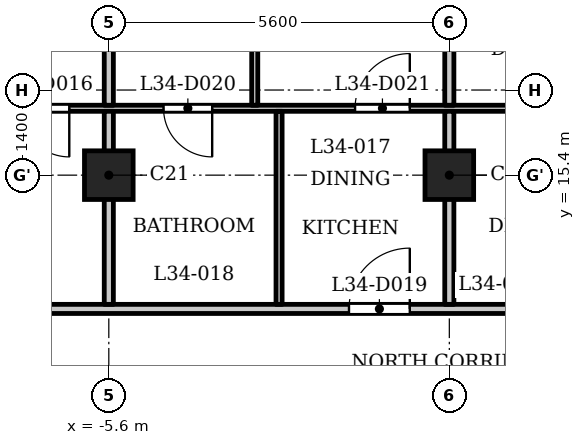
"""IFC4 building model, lengths in metres.
Left out: names, types, materials, properties, quantities, classifications, styles, units other than length and angle.
Written with IfcOpenShell. Run it as: python <this file> out.ifc"""

import sys

from ifc_helpers import new_model, si_unit, direction, frame, frame_2d, origin, origin_2d, place, context, subcontext, project, spatial, rectangle, extrude, element, fill, save


model = new_model("IFC4")
c1 = context("Model", 3, precision=1e-05, world=origin(), true_north=direction((0.0, 1.0)))
c2 = subcontext(c1, "Body", "Model", "MODEL_VIEW")
j1 = project(units=[si_unit("LENGTHUNIT", "METRE"), si_unit("PLANEANGLEUNIT", "RADIAN")], contexts=[c1])
p1 = place(None, origin())
s1 = spatial("IfcSite", under=j1, at=p1, CompositionType="ELEMENT")
p2 = place(p1, origin())
s2 = spatial("IfcBuilding", under=s1, at=p2, CompositionType="ELEMENT")
p3 = place(p2, frame((0.0, 0.0, 136.1)))
s3 = spatial("IfcBuildingStorey", under=s2, at=p3, CompositionType="ELEMENT", Elevation=136.1)
for number, where, z_axis, x_axis in (
    (1, (-5.6, 15.4, 0.0), (0.0, 0.0, 1.0), (1.0, 0.0, 0.0)),
    (2, (0.0, 15.4, 0.0), (0.0, 0.0, 1.0), (1.0, 0.0, 0.0)),
):
    element("IfcColumn", number, at=place(p3, frame(where, z_axis=z_axis, x_axis=x_axis)), inside=s3, PredefinedType="COLUMN", context=c2, shape_type="SweptSolid", body=[
        extrude(rectangle(XDim=0.8, YDim=0.8, at=origin_2d()), origin(), (0.0, 0.0, 1.0), 3.5),
    ])
p4 = place(p3, frame((-17.4, 13.2, 0.0), z_axis=(0.0, 0.0, 1.0), x_axis=(1.0, 0.0, 0.0)))
e3 = element("IfcWall", 3, at=p4, inside=s3, PredefinedType="PARTITIONING", context=c2, shape_type="SweptSolid", body=[
    extrude(rectangle(XDim=34.8, YDim=0.15, at=frame_2d((17.4, 0.0))), origin(), (0.0, 0.0, 1.0), 3.2),
])
p5 = place(p4, frame((0.25, 0.0, 0.0)))
e4 = element("IfcOpeningElement", 4, at=p5, cuts=e3, PredefinedType="OPENING", context=c2, shape_type="SweptSolid", body=[
    extrude(rectangle(XDim=1.0, YDim=2.1, at=frame_2d((0.5, 1.05))), frame((0.0, 0.085, 0.0), z_axis=(0.0, -1.0, 0.0), x_axis=(1.0, 0.0, 0.0)), (0.0, 0.0, 1.0), 0.17),
])
p6 = place(p4, frame((33.65, 0.0, 0.0)))
e5 = element("IfcOpeningElement", 5, at=p6, cuts=e3, PredefinedType="OPENING", context=c2, shape_type="SweptSolid", body=[
    extrude(rectangle(XDim=1.0, YDim=2.1, at=frame_2d((0.5, 1.05))), frame((0.0, 0.085, 0.0), z_axis=(0.0, -1.0, 0.0), x_axis=(1.0, 0.0, 0.0)), (0.0, 0.0, 1.0), 0.17),
])
p7 = place(p4, frame((15.75, 0.0, 0.0)))
e6 = element("IfcOpeningElement", 6, at=p7, cuts=e3, PredefinedType="OPENING", context=c2, shape_type="SweptSolid", body=[
    extrude(rectangle(XDim=1.0, YDim=2.1, at=frame_2d((0.5, 1.05))), frame((0.0, 0.085, 0.0), z_axis=(0.0, -1.0, 0.0), x_axis=(1.0, 0.0, 0.0)), (0.0, 0.0, 1.0), 0.17),
])
p8 = place(p4, frame((19.35, 0.0, 0.0)))
e7 = element("IfcOpeningElement", 7, at=p8, cuts=e3, PredefinedType="OPENING", context=c2, shape_type="SweptSolid", body=[
    extrude(rectangle(XDim=1.0, YDim=2.1, at=frame_2d((0.5, 1.05))), frame((0.0, 0.085, 0.0), z_axis=(0.0, -1.0, 0.0), x_axis=(1.0, 0.0, 0.0)), (0.0, 0.0, 1.0), 0.17),
])
p9 = place(p4, frame((26.95, 0.0, 0.0)))
e8 = element("IfcOpeningElement", 8, at=p9, cuts=e3, PredefinedType="OPENING", context=c2, shape_type="SweptSolid", body=[
    extrude(rectangle(XDim=1.0, YDim=2.1, at=frame_2d((0.5, 1.05))), frame((0.0, 0.085, 0.0), z_axis=(0.0, -1.0, 0.0), x_axis=(1.0, 0.0, 0.0)), (0.0, 0.0, 1.0), 0.17),
])
p10 = place(p4, frame((29.75, 0.0, 0.0)))
e9 = element("IfcOpeningElement", 9, at=p10, cuts=e3, PredefinedType="OPENING", context=c2, shape_type="SweptSolid", body=[
    extrude(rectangle(XDim=1.0, YDim=2.1, at=frame_2d((0.5, 1.05))), frame((0.0, 0.085, 0.0), z_axis=(0.0, -1.0, 0.0), x_axis=(1.0, 0.0, 0.0)), (0.0, 0.0, 1.0), 0.17),
])
p11 = place(p3, frame((-16.725, 16.5, 0.0), z_axis=(0.0, 0.0, 1.0), x_axis=(1.0, 0.0, 0.0)))
e10 = element("IfcWall", 10, at=p11, inside=s3, PredefinedType="PARTITIONING", context=c2, shape_type="SweptSolid", body=[
    extrude(rectangle(XDim=33.45, YDim=0.1, at=frame_2d((16.725, 0.0))), origin(), (0.0, 0.0, 1.0), 3.2),
])
p12 = place(p11, frame((9.675, 0.0, 0.0)))
e11 = element("IfcOpeningElement", 11, at=p12, cuts=e10, PredefinedType="OPENING", context=c2, shape_type="SweptSolid", body=[
    extrude(rectangle(XDim=0.8, YDim=2.1, at=frame_2d((0.4, 1.05))), frame((0.0, 0.06, 0.0), z_axis=(0.0, -1.0, 0.0), x_axis=(1.0, 0.0, 0.0)), (0.0, 0.0, 1.0), 0.12),
])
p13 = place(p11, frame((3.975, 0.0, 0.0)))
e12 = element("IfcOpeningElement", 12, at=p13, cuts=e10, PredefinedType="OPENING", context=c2, shape_type="SweptSolid", body=[
    extrude(rectangle(XDim=0.9, YDim=2.1, at=frame_2d((0.45, 1.05))), frame((0.0, 0.06, 0.0), z_axis=(0.0, -1.0, 0.0), x_axis=(1.0, 0.0, 0.0)), (0.0, 0.0, 1.0), 0.12),
])
p14 = place(p11, frame((12.025, 0.0, 0.0)))
e13 = element("IfcOpeningElement", 13, at=p14, cuts=e10, PredefinedType="OPENING", context=c2, shape_type="SweptSolid", body=[
    extrude(rectangle(XDim=0.8, YDim=2.1, at=frame_2d((0.4, 1.05))), frame((0.0, 0.06, 0.0), z_axis=(0.0, -1.0, 0.0), x_axis=(1.0, 0.0, 0.0)), (0.0, 0.0, 1.0), 0.12),
])
p15 = place(p11, frame((15.175, 0.0, 0.0)))
e14 = element("IfcOpeningElement", 14, at=p15, cuts=e10, PredefinedType="OPENING", context=c2, shape_type="SweptSolid", body=[
    extrude(rectangle(XDim=0.9, YDim=2.1, at=frame_2d((0.45, 1.05))), frame((0.0, 0.06, 0.0), z_axis=(0.0, -1.0, 0.0), x_axis=(1.0, 0.0, 0.0)), (0.0, 0.0, 1.0), 0.12),
])
p16 = place(p11, frame((20.975, 0.0, 0.0)))
e15 = element("IfcOpeningElement", 15, at=p16, cuts=e10, PredefinedType="OPENING", context=c2, shape_type="SweptSolid", body=[
    extrude(rectangle(XDim=0.8, YDim=2.1, at=frame_2d((0.4, 1.05))), frame((0.0, 0.06, 0.0), z_axis=(0.0, -1.0, 0.0), x_axis=(1.0, 0.0, 0.0)), (0.0, 0.0, 1.0), 0.12),
])
p17 = place(p11, frame((18.175, 0.0, 0.0)))
e16 = element("IfcOpeningElement", 16, at=p17, cuts=e10, PredefinedType="OPENING", context=c2, shape_type="SweptSolid", body=[
    extrude(rectangle(XDim=0.9, YDim=2.1, at=frame_2d((0.45, 1.05))), frame((0.0, 0.06, 0.0), z_axis=(0.0, -1.0, 0.0), x_axis=(1.0, 0.0, 0.0)), (0.0, 0.0, 1.0), 0.12),
])
p18 = place(p11, frame((23.725, 0.0, 0.0)))
e17 = element("IfcOpeningElement", 17, at=p18, cuts=e10, PredefinedType="OPENING", context=c2, shape_type="SweptSolid", body=[
    extrude(rectangle(XDim=0.8, YDim=2.1, at=frame_2d((0.4, 1.05))), frame((0.0, 0.06, 0.0), z_axis=(0.0, -1.0, 0.0), x_axis=(1.0, 0.0, 0.0)), (0.0, 0.0, 1.0), 0.12),
])
p19 = place(p11, frame((26.125, 0.0, 0.0)))
e18 = element("IfcOpeningElement", 18, at=p19, cuts=e10, PredefinedType="OPENING", context=c2, shape_type="SweptSolid", body=[
    extrude(rectangle(XDim=0.9, YDim=2.1, at=frame_2d((0.45, 1.05))), frame((0.0, 0.06, 0.0), z_axis=(0.0, -1.0, 0.0), x_axis=(1.0, 0.0, 0.0)), (0.0, 0.0, 1.0), 0.12),
])
p20 = place(p11, frame((32.125, 0.0, 0.0)))
e19 = element("IfcOpeningElement", 19, at=p20, cuts=e10, PredefinedType="OPENING", context=c2, shape_type="SweptSolid", body=[
    extrude(rectangle(XDim=0.8, YDim=2.1, at=frame_2d((0.4, 1.05))), frame((0.0, 0.06, 0.0), z_axis=(0.0, -1.0, 0.0), x_axis=(1.0, 0.0, 0.0)), (0.0, 0.0, 1.0), 0.12),
])
p21 = place(p11, frame((28.975, 0.0, 0.0)))
e20 = element("IfcOpeningElement", 20, at=p21, cuts=e10, PredefinedType="OPENING", context=c2, shape_type="SweptSolid", body=[
    extrude(rectangle(XDim=0.9, YDim=2.1, at=frame_2d((0.45, 1.05))), frame((0.0, 0.06, 0.0), z_axis=(0.0, -1.0, 0.0), x_axis=(1.0, 0.0, 0.0)), (0.0, 0.0, 1.0), 0.12),
])
p22 = place(p3, frame((-5.6, 13.275, 0.0), z_axis=(0.0, 0.0, 1.0), x_axis=(0.0, 1.0, 0.0)))
e21 = element("IfcWall", 21, at=p22, inside=s3, PredefinedType="PARTITIONING", context=c2, shape_type="SweptSolid", body=[
    extrude(rectangle(XDim=3.175, YDim=0.15, at=frame_2d((1.587, 0.0))), origin(), (0.0, 0.0, 1.0), 3.2),
])
p23 = place(p3, frame((-5.6, 16.55, 0.0), z_axis=(0.0, 0.0, 1.0), x_axis=(0.0, 1.0, 0.0)))
e22 = element("IfcWall", 22, at=p23, inside=s3, PredefinedType="PARTITIONING", context=c2, shape_type="SweptSolid", body=[
    extrude(rectangle(XDim=6.38, YDim=0.15, at=frame_2d((3.19, 0.0))), origin(), (0.0, 0.0, 1.0), 3.2),
])
p24 = place(p3, frame((-3.2, 16.55, 0.0), z_axis=(0.0, 0.0, 1.0), x_axis=(0.0, 1.0, 0.0)))
e23 = element("IfcWall", 23, at=p24, inside=s3, PredefinedType="PARTITIONING", context=c2, shape_type="SweptSolid", body=[
    extrude(rectangle(XDim=5.53, YDim=0.1, at=frame_2d((2.765, 0.0))), origin(), (0.0, 0.0, 1.0), 3.2),
])
p25 = place(p24, frame((1.46, 0.0, 0.0)))
e24 = element("IfcOpeningElement", 24, at=p25, cuts=e23, PredefinedType="OPENING", context=c2, shape_type="SweptSolid", body=[
    extrude(rectangle(XDim=0.9, YDim=2.1, at=frame_2d((0.45, 1.05))), frame((0.0, 0.06, 0.0), z_axis=(0.0, -1.0, 0.0), x_axis=(1.0, 0.0, 0.0)), (0.0, 0.0, 1.0), 0.12),
])
p26 = place(p3, frame((-2.8, 13.275, 0.0), z_axis=(0.0, 0.0, 1.0), x_axis=(0.0, 1.0, 0.0)))
e25 = element("IfcWall", 25, at=p26, inside=s3, PredefinedType="PARTITIONING", context=c2, shape_type="SweptSolid", body=[
    extrude(rectangle(XDim=3.175, YDim=0.1, at=frame_2d((1.587, 0.0))), origin(), (0.0, 0.0, 1.0), 3.2),
])
p27 = place(p3, frame((0.0, 13.275, 0.0), z_axis=(0.0, 0.0, 1.0), x_axis=(0.0, 1.0, 0.0)))
e26 = element("IfcWall", 26, at=p27, inside=s3, PredefinedType="PARTITIONING", context=c2, shape_type="SweptSolid", body=[
    extrude(rectangle(XDim=3.175, YDim=0.15, at=frame_2d((1.587, 0.0))), origin(), (0.0, 0.0, 1.0), 3.2),
])
p28 = place(p3, frame((0.0, 16.55, 0.0), z_axis=(0.0, 0.0, 1.0), x_axis=(0.0, 1.0, 0.0)))
e27 = element("IfcWall", 27, at=p28, inside=s3, PredefinedType="PARTITIONING", context=c2, shape_type="SweptSolid", body=[
    extrude(rectangle(XDim=6.38, YDim=0.15, at=frame_2d((3.19, 0.0))), origin(), (0.0, 0.0, 1.0), 3.2),
])
p29 = place(p12, origin())
e28 = element("IfcDoor", 28, at=p29, inside=s3, OperationType="SINGLE_SWING_RIGHT", PredefinedType="DOOR", context=c2, shape_type="SweptSolid", body=[
    extrude(rectangle(XDim=0.8, YDim=2.1, at=frame_2d((0.4, 1.05))), frame((0.0, 0.025, 0.0), z_axis=(0.0, -1.0, 0.0), x_axis=(1.0, 0.0, 0.0)), (0.0, 0.0, 1.0), 0.05),
])
fill(e11, e28)
p30 = place(p7, origin())
e29 = element("IfcDoor", 29, at=p30, inside=s3, OperationType="SINGLE_SWING_LEFT", PredefinedType="DOOR", context=c2, shape_type="SweptSolid", body=[
    extrude(rectangle(XDim=1.0, YDim=2.1, at=frame_2d((0.5, 1.05))), frame((0.0, 0.025, 0.0), z_axis=(0.0, -1.0, 0.0), x_axis=(1.0, 0.0, 0.0)), (0.0, 0.0, 1.0), 0.05),
])
fill(e6, e29)
p31 = place(p14, origin())
e30 = element("IfcDoor", 30, at=p31, inside=s3, OperationType="SINGLE_SWING_RIGHT", PredefinedType="DOOR", context=c2, shape_type="SweptSolid", body=[
    extrude(rectangle(XDim=0.8, YDim=2.1, at=frame_2d((0.4, 1.05))), frame((0.0, 0.025, 0.0), z_axis=(0.0, -1.0, 0.0), x_axis=(1.0, 0.0, 0.0)), (0.0, 0.0, 1.0), 0.05),
])
fill(e13, e30)
p32 = place(p15, origin())
e31 = element("IfcDoor", 31, at=p32, inside=s3, OperationType="SINGLE_SWING_LEFT", PredefinedType="DOOR", context=c2, shape_type="SweptSolid", body=[
    extrude(rectangle(XDim=0.9, YDim=2.1, at=frame_2d((0.45, 1.05))), frame((0.0, 0.025, 0.0), z_axis=(0.0, -1.0, 0.0), x_axis=(1.0, 0.0, 0.0)), (0.0, 0.0, 1.0), 0.05),
])
fill(e14, e31)
save(model, sys.argv[1])
